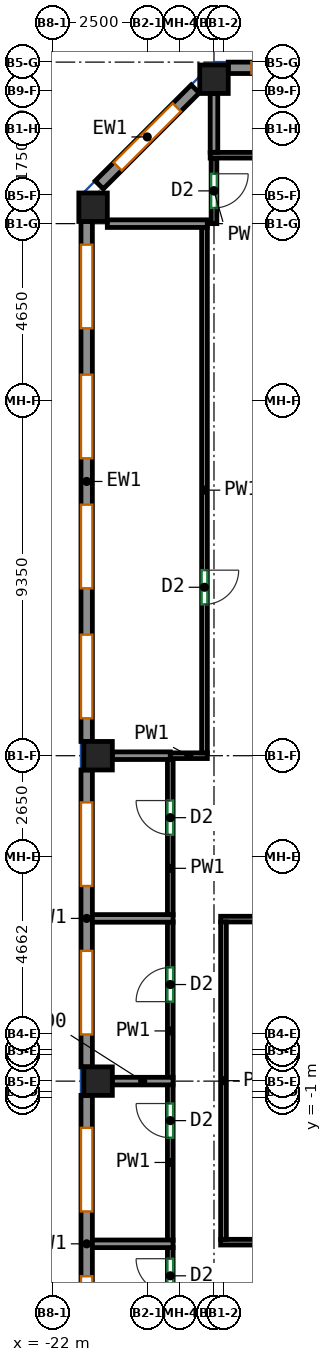
"""IFC4 building model, lengths in metres.
Left out: names, types, materials, properties, quantities, classifications, styles, units other than length and angle.
Written with IfcOpenShell. Run it as: python <this file> out.ifc"""

import sys

from ifc_helpers import new_model, si_unit, direction, frame, frame_2d, origin, origin_2d, place, context, subcontext, project, spatial, rectangle, extrude, source, transform, mapped, element, fill, save


model = new_model("IFC4")
c1 = context("Model", 3, precision=1e-05, world=origin(), true_north=direction((0.0, 1.0)))
c2 = subcontext(c1, "Body", "Model", "MODEL_VIEW")
j1 = project(units=[si_unit("LENGTHUNIT", "METRE"), si_unit("PLANEANGLEUNIT", "RADIAN")], contexts=[c1])
p1 = place(None, origin())
s1 = spatial("IfcSite", under=j1, at=p1, CompositionType="ELEMENT")
p2 = place(p1, origin())
s2 = spatial("IfcBuilding", under=s1, at=p2, CompositionType="ELEMENT")
p3 = place(p2, frame((0.0, 0.0, 220.3)))
s3 = spatial("IfcBuildingStorey", under=s2, at=p3, CompositionType="ELEMENT", Elevation=220.3)
m1 = source(origin(), c2, "Body", "SweptSolid", [
    extrude(rectangle(XDim=0.75, YDim=0.75, at=origin_2d()), origin(), (0.0, 0.0, 1.0), 3.0),
])
for number, where, z_axis, x_axis in (
    (1, (-20.932, 22.432, 0.0), (0.0, 0.0, 1.0), (1.0, 0.0, 0.0)),
    (2, (-20.8, -0.562, 0.0), (0.0, 0.0, 1.0), (1.0, 0.0, 0.0)),
    (3, (-20.8, 8.0, 0.0), (0.0, 0.0, 1.0), (1.0, 0.0, 0.0)),
    (4, (-17.75, 25.8, 0.0), (0.0, 0.0, 1.0), (1.0, 0.0, 0.0)),
):
    element("IfcColumn", number, at=place(p3, frame(where, z_axis=z_axis, x_axis=x_axis)), inside=s3, PredefinedType="COLUMN", context=c2, shape_type="MappedRepresentation", body=[
        mapped(m1, transform((0.0, 0.0, 0.0))),
    ])
m2 = source(origin(), c2, "Body", "SweptSolid", [
    extrude(rectangle(XDim=6.833, YDim=0.3, at=frame_2d((3.417, 0.0))), origin(), (0.0, 0.0, 1.0), 3.0),
])
p4 = place(p3, frame((-10.542, 26.1, 0.0), z_axis=(0.0, 0.0, 1.0), x_axis=(-1.0, 0.0, 0.0)))
e5 = element("IfcWall", 5, at=p4, inside=s3, PredefinedType="SOLIDWALL", context=c2, shape_type="MappedRepresentation", body=[
    mapped(m2, transform((0.0, 0.0, 0.0))),
])
p5 = place(p4, frame((0.608, 0.0, 0.85)))
e6 = element("IfcOpeningElement", 6, at=p5, cuts=e5, PredefinedType="OPENING", context=c2, shape_type="SweptSolid", body=[
    extrude(rectangle(XDim=2.2, YDim=1.95, at=frame_2d((1.1, 0.975))), frame((0.0, 0.16, 0.0), z_axis=(0.0, -1.0, 0.0), x_axis=(1.0, 0.0, 0.0)), (0.0, 0.0, 1.0), 0.32),
])
p6 = place(p4, frame((4.025, 0.0, 0.85)))
e7 = element("IfcOpeningElement", 7, at=p6, cuts=e5, PredefinedType="OPENING", context=c2, shape_type="SweptSolid", body=[
    extrude(rectangle(XDim=2.2, YDim=1.95, at=frame_2d((1.1, 0.975))), frame((0.0, 0.16, 0.0), z_axis=(0.0, -1.0, 0.0), x_axis=(1.0, 0.0, 0.0)), (0.0, 0.0, 1.0), 0.32),
])
m3 = source(origin(), c2, "Body", "SweptSolid", [
    extrude(rectangle(XDim=3.571, YDim=0.3, at=frame_2d((1.786, 0.0))), origin(), (0.0, 0.0, 1.0), 3.0),
])
p7 = place(p3, frame((-18.244, 25.544, 0.0), z_axis=(0.0, 0.0, 1.0), x_axis=(-0.707072595841, -0.707140964879, 0.0)))
e8 = element("IfcWall", 8, at=p7, inside=s3, PredefinedType="SOLIDWALL", context=c2, shape_type="MappedRepresentation", body=[
    mapped(m3, transform((0.0, 0.0, 0.0))),
])
p8 = place(p7, frame((0.686, 0.0, 0.85)))
e9 = element("IfcOpeningElement", 9, at=p8, cuts=e8, PredefinedType="OPENING", context=c2, shape_type="SweptSolid", body=[
    extrude(rectangle(XDim=2.2, YDim=1.95, at=frame_2d((1.1, 0.975))), frame((0.0, 0.16, 0.0), z_axis=(0.0, -1.0, 0.0), x_axis=(1.0, 0.0, 0.0)), (0.0, 0.0, 1.0), 0.32),
])
m4 = source(origin(), c2, "Body", "SweptSolid", [
    extrude(rectangle(XDim=13.682, YDim=0.3, at=frame_2d((6.841, 0.0))), origin(), (0.0, 0.0, 1.0), 3.0),
])
p9 = place(p3, frame((-21.1, 22.057, 0.0), z_axis=(0.0, 0.0, 1.0), x_axis=(0.0, -1.0, 0.0)))
e10 = element("IfcWall", 10, at=p9, inside=s3, PredefinedType="SOLIDWALL", context=c2, shape_type="MappedRepresentation", body=[
    mapped(m4, transform((0.0, 0.0, 0.0))),
])
p10 = place(p9, frame((0.61, 0.0, 0.85)))
e11 = element("IfcOpeningElement", 11, at=p10, cuts=e10, PredefinedType="OPENING", context=c2, shape_type="SweptSolid", body=[
    extrude(rectangle(XDim=2.2, YDim=1.95, at=frame_2d((1.1, 0.975))), frame((0.0, 0.16, 0.0), z_axis=(0.0, -1.0, 0.0), x_axis=(1.0, 0.0, 0.0)), (0.0, 0.0, 1.0), 0.32),
])
p11 = place(p9, frame((4.031, 0.0, 0.85)))
e12 = element("IfcOpeningElement", 12, at=p11, cuts=e10, PredefinedType="OPENING", context=c2, shape_type="SweptSolid", body=[
    extrude(rectangle(XDim=2.2, YDim=1.95, at=frame_2d((1.1, 0.975))), frame((0.0, 0.16, 0.0), z_axis=(0.0, -1.0, 0.0), x_axis=(1.0, 0.0, 0.0)), (0.0, 0.0, 1.0), 0.32),
])
p12 = place(p9, frame((7.451, 0.0, 0.85)))
e13 = element("IfcOpeningElement", 13, at=p12, cuts=e10, PredefinedType="OPENING", context=c2, shape_type="SweptSolid", body=[
    extrude(rectangle(XDim=2.2, YDim=1.95, at=frame_2d((1.1, 0.975))), frame((0.0, 0.16, 0.0), z_axis=(0.0, -1.0, 0.0), x_axis=(1.0, 0.0, 0.0)), (0.0, 0.0, 1.0), 0.32),
])
p13 = place(p9, frame((10.872, 0.0, 0.85)))
e14 = element("IfcOpeningElement", 14, at=p13, cuts=e10, PredefinedType="OPENING", context=c2, shape_type="SweptSolid", body=[
    extrude(rectangle(XDim=2.2, YDim=1.95, at=frame_2d((1.1, 0.975))), frame((0.0, 0.16, 0.0), z_axis=(0.0, -1.0, 0.0), x_axis=(1.0, 0.0, 0.0)), (0.0, 0.0, 1.0), 0.32),
])
m5 = source(origin(), c2, "Body", "SweptSolid", [
    extrude(rectangle(XDim=7.812, YDim=0.3, at=frame_2d((3.906, 0.0))), origin(), (0.0, 0.0, 1.0), 3.0),
])
p14 = place(p3, frame((-21.1, 7.625, 0.0), z_axis=(0.0, 0.0, 1.0), x_axis=(0.0, -1.0, 0.0)))
e15 = element("IfcWall", 15, at=p14, inside=s3, PredefinedType="SOLIDWALL", context=c2, shape_type="MappedRepresentation", body=[
    mapped(m5, transform((0.0, 0.0, 0.0))),
])
p15 = place(p14, frame((0.853, 0.0, 0.85)))
e16 = element("IfcOpeningElement", 16, at=p15, cuts=e15, PredefinedType="OPENING", context=c2, shape_type="SweptSolid", body=[
    extrude(rectangle(XDim=2.2, YDim=1.95, at=frame_2d((1.1, 0.975))), frame((0.0, 0.16, 0.0), z_axis=(0.0, -1.0, 0.0), x_axis=(1.0, 0.0, 0.0)), (0.0, 0.0, 1.0), 0.32),
])
p16 = place(p14, frame((4.759, 0.0, 0.85)))
e17 = element("IfcOpeningElement", 17, at=p16, cuts=e15, PredefinedType="OPENING", context=c2, shape_type="SweptSolid", body=[
    extrude(rectangle(XDim=2.2, YDim=1.95, at=frame_2d((1.1, 0.975))), frame((0.0, 0.16, 0.0), z_axis=(0.0, -1.0, 0.0), x_axis=(1.0, 0.0, 0.0)), (0.0, 0.0, 1.0), 0.32),
])
p17 = place(p3, frame((-21.1, -0.938, 0.0), z_axis=(0.0, 0.0, 1.0), x_axis=(0.0, -1.0, 0.0)))
e18 = element("IfcWall", 18, at=p17, inside=s3, PredefinedType="SOLIDWALL", context=c2, shape_type="MappedRepresentation", body=[
    mapped(m5, transform((0.0, 0.0, 0.0))),
])
p18 = place(p17, frame((0.853, 0.0, 0.85)))
e19 = element("IfcOpeningElement", 19, at=p18, cuts=e18, PredefinedType="OPENING", context=c2, shape_type="SweptSolid", body=[
    extrude(rectangle(XDim=2.2, YDim=1.95, at=frame_2d((1.1, 0.975))), frame((0.0, 0.16, 0.0), z_axis=(0.0, -1.0, 0.0), x_axis=(1.0, 0.0, 0.0)), (0.0, 0.0, 1.0), 0.32),
])
p19 = place(p17, frame((4.76, 0.0, 0.85)))
e20 = element("IfcOpeningElement", 20, at=p19, cuts=e18, PredefinedType="OPENING", context=c2, shape_type="SweptSolid", body=[
    extrude(rectangle(XDim=2.2, YDim=1.95, at=frame_2d((1.1, 0.975))), frame((0.0, 0.16, 0.0), z_axis=(0.0, -1.0, 0.0), x_axis=(1.0, 0.0, 0.0)), (0.0, 0.0, 1.0), 0.32),
])
p20 = place(p3, frame((-17.925, 8.0, 0.0), z_axis=(0.0, 0.0, 1.0), x_axis=(-1.0, 0.0, 0.0)))
e21 = element("IfcWall", 21, at=p20, inside=s3, PredefinedType="PARTITIONING", context=c2, shape_type="SweptSolid", body=[
    extrude(rectangle(XDim=0.976, YDim=0.15, at=frame_2d((0.488, 0.0))), origin(), (0.0, 0.0, 1.0), 3.0),
])
p21 = place(p3, frame((-18.0, 21.9, 0.0), z_axis=(0.0, 0.0, 1.0), x_axis=(0.0, -1.0, 0.0)))
e22 = element("IfcWall", 22, at=p21, inside=s3, PredefinedType="PARTITIONING", context=c2, shape_type="SweptSolid", body=[
    extrude(rectangle(XDim=13.825, YDim=0.15, at=frame_2d((6.913, 0.0))), origin(), (0.0, 0.0, 1.0), 3.0),
])
p22 = place(p21, frame((9.018, 0.0, 0.0)))
e23 = element("IfcOpeningElement", 23, at=p22, cuts=e22, PredefinedType="OPENING", context=c2, shape_type="SweptSolid", body=[
    extrude(rectangle(XDim=0.9, YDim=2.1, at=frame_2d((0.45, 1.05))), frame((0.0, 0.085, 0.0), z_axis=(0.0, -1.0, 0.0), x_axis=(1.0, 0.0, 0.0)), (0.0, 0.0, 1.0), 0.17),
])
p23 = place(p3, frame((-18.9, -7.757, 0.0), z_axis=(0.0, 0.0, 1.0), x_axis=(0.0, 1.0, 0.0)))
e24 = element("IfcWall", 24, at=p23, inside=s3, PredefinedType="PARTITIONING", context=c2, shape_type="SweptSolid", body=[
    extrude(rectangle(XDim=2.824, YDim=0.15, at=frame_2d((1.412, 0.0))), origin(), (0.0, 0.0, 1.0), 3.0),
])
p24 = place(p23, frame((1.622, 0.0, 0.0)))
e25 = element("IfcOpeningElement", 25, at=p24, cuts=e24, PredefinedType="OPENING", context=c2, shape_type="SweptSolid", body=[
    extrude(rectangle(XDim=0.9, YDim=2.1, at=frame_2d((0.45, 1.05))), frame((0.0, 0.085, 0.0), z_axis=(0.0, -1.0, 0.0), x_axis=(1.0, 0.0, 0.0)), (0.0, 0.0, 1.0), 0.17),
])
p25 = place(p3, frame((-18.9, -4.753, 0.0), z_axis=(0.0, 0.0, 1.0), x_axis=(0.0, 1.0, 0.0)))
e26 = element("IfcWall", 26, at=p25, inside=s3, PredefinedType="PARTITIONING", context=c2, shape_type="SweptSolid", body=[
    extrude(rectangle(XDim=4.101, YDim=0.15, at=frame_2d((2.05, 0.0))), origin(), (0.0, 0.0, 1.0), 3.0),
])
p26 = place(p25, frame((2.701, 0.0, 0.0)))
e27 = element("IfcOpeningElement", 27, at=p26, cuts=e26, PredefinedType="OPENING", context=c2, shape_type="SweptSolid", body=[
    extrude(rectangle(XDim=0.9, YDim=2.1, at=frame_2d((0.45, 1.05))), frame((0.0, 0.085, 0.0), z_axis=(0.0, -1.0, 0.0), x_axis=(1.0, 0.0, 0.0)), (0.0, 0.0, 1.0), 0.17),
])
p27 = place(p3, frame((-18.9, -0.472, 0.0), z_axis=(0.0, 0.0, 1.0), x_axis=(0.0, 1.0, 0.0)))
e28 = element("IfcWall", 28, at=p27, inside=s3, PredefinedType="PARTITIONING", context=c2, shape_type="SweptSolid", body=[
    extrude(rectangle(XDim=4.101, YDim=0.15, at=frame_2d((2.05, 0.0))), origin(), (0.0, 0.0, 1.0), 3.0),
])
p28 = place(p27, frame((2.001, 0.0, 0.0)))
e29 = element("IfcOpeningElement", 29, at=p28, cuts=e28, PredefinedType="OPENING", context=c2, shape_type="SweptSolid", body=[
    extrude(rectangle(XDim=0.9, YDim=2.1, at=frame_2d((0.45, 1.05))), frame((0.0, 0.085, 0.0), z_axis=(0.0, -1.0, 0.0), x_axis=(1.0, 0.0, 0.0)), (0.0, 0.0, 1.0), 0.17),
])
p29 = place(p3, frame((-18.9, 3.809, 0.0), z_axis=(0.0, 0.0, 1.0), x_axis=(0.0, 1.0, 0.0)))
e30 = element("IfcWall", 30, at=p29, inside=s3, PredefinedType="PARTITIONING", context=c2, shape_type="SweptSolid", body=[
    extrude(rectangle(XDim=4.092, YDim=0.15, at=frame_2d((2.046, 0.0))), origin(), (0.0, 0.0, 1.0), 3.0),
])
p30 = place(p29, frame((2.111, 0.0, 0.0)))
e31 = element("IfcOpeningElement", 31, at=p30, cuts=e30, PredefinedType="OPENING", context=c2, shape_type="SweptSolid", body=[
    extrude(rectangle(XDim=0.9, YDim=2.1, at=frame_2d((0.45, 1.05))), frame((0.0, 0.085, 0.0), z_axis=(0.0, -1.0, 0.0), x_axis=(1.0, 0.0, 0.0)), (0.0, 0.0, 1.0), 0.17),
])
p31 = place(p3, frame((-17.75, 23.725, 0.0), z_axis=(0.0, 0.0, 1.0), x_axis=(0.0, -1.0, 0.0)))
e32 = element("IfcWall", 32, at=p31, inside=s3, PredefinedType="PARTITIONING", context=c2, shape_type="SweptSolid", body=[
    extrude(rectangle(XDim=1.725, YDim=0.15, at=frame_2d((0.863, 0.0))), origin(), (0.0, 0.0, 1.0), 3.0),
])
p32 = place(p31, frame((0.413, 0.0, 0.0)))
e33 = element("IfcOpeningElement", 33, at=p32, cuts=e32, PredefinedType="OPENING", context=c2, shape_type="SweptSolid", body=[
    extrude(rectangle(XDim=0.9, YDim=2.1, at=frame_2d((0.45, 1.05))), frame((0.0, 0.085, 0.0), z_axis=(0.0, -1.0, 0.0), x_axis=(1.0, 0.0, 0.0)), (0.0, 0.0, 1.0), 0.17),
])
p33 = place(p3, frame((27.85, 23.8, 0.0), z_axis=(0.0, 0.0, 1.0), x_axis=(-1.0, 0.0, 0.0)))
e34 = element("IfcWall", 34, at=p33, inside=s3, PredefinedType="PARTITIONING", context=c2, shape_type="SweptSolid", body=[
    extrude(rectangle(XDim=45.7, YDim=0.15, at=frame_2d((22.85, 0.0))), origin(), (0.0, 0.0, 1.0), 3.0),
])
p34 = place(p33, frame((34.978, 0.0, 0.0)))
e35 = element("IfcOpeningElement", 35, at=p34, cuts=e34, PredefinedType="OPENING", context=c2, shape_type="SweptSolid", body=[
    extrude(rectangle(XDim=0.9, YDim=2.1, at=frame_2d((0.45, 1.05))), frame((0.0, 0.085, 0.0), z_axis=(0.0, -1.0, 0.0), x_axis=(1.0, 0.0, 0.0)), (0.0, 0.0, 1.0), 0.17),
])
p35 = place(p3, frame((-17.575, -4.8, 0.0), z_axis=(0.0, 0.0, 1.0), x_axis=(1.0, 0.0, 0.0)))
e36 = element("IfcWall", 36, at=p35, inside=s3, PredefinedType="PARTITIONING", context=c2, shape_type="SweptSolid", body=[
    extrude(rectangle(XDim=3.702, YDim=0.15, at=frame_2d((1.851, 0.0))), origin(), (0.0, 0.0, 1.0), 3.0),
])
p36 = place(p3, frame((-17.575, 3.7, 0.0), z_axis=(0.0, 0.0, 1.0), x_axis=(1.0, 0.0, 0.0)))
e37 = element("IfcWall", 37, at=p36, inside=s3, PredefinedType="PARTITIONING", context=c2, shape_type="SweptSolid", body=[
    extrude(rectangle(XDim=33.85, YDim=0.15, at=frame_2d((16.925, 0.0))), origin(), (0.0, 0.0, 1.0), 3.0),
])
p37 = place(p36, frame((4.301, 0.0, 0.0)))
e38 = element("IfcOpeningElement", 38, at=p37, cuts=e37, PredefinedType="OPENING", context=c2, shape_type="SweptSolid", body=[
    extrude(rectangle(XDim=0.9, YDim=2.1, at=frame_2d((0.45, 1.05))), frame((0.0, 0.085, 0.0), z_axis=(0.0, -1.0, 0.0), x_axis=(1.0, 0.0, 0.0)), (0.0, 0.0, 1.0), 0.17),
])
p38 = place(p36, frame((18.816, 0.0, 0.0)))
e39 = element("IfcOpeningElement", 39, at=p38, cuts=e37, PredefinedType="OPENING", context=c2, shape_type="SweptSolid", body=[
    extrude(rectangle(XDim=0.9, YDim=2.1, at=frame_2d((0.45, 1.05))), frame((0.0, 0.085, 0.0), z_axis=(0.0, -1.0, 0.0), x_axis=(1.0, 0.0, 0.0)), (0.0, 0.0, 1.0), 0.17),
])
p39 = place(p36, frame((26.656, 0.0, 0.0)))
e40 = element("IfcOpeningElement", 40, at=p39, cuts=e37, PredefinedType="OPENING", context=c2, shape_type="SweptSolid", body=[
    extrude(rectangle(XDim=0.9, YDim=2.1, at=frame_2d((0.45, 1.05))), frame((0.0, 0.085, 0.0), z_axis=(0.0, -1.0, 0.0), x_axis=(1.0, 0.0, 0.0)), (0.0, 0.0, 1.0), 0.17),
])
p40 = place(p3, frame((-17.5, -4.725, 0.0), z_axis=(0.0, 0.0, 1.0), x_axis=(0.0, 1.0, 0.0)))
e41 = element("IfcWall", 41, at=p40, inside=s3, PredefinedType="PARTITIONING", context=c2, shape_type="SweptSolid", body=[
    extrude(rectangle(XDim=8.35, YDim=0.15, at=frame_2d((4.175, 0.0))), origin(), (0.0, 0.0, 1.0), 3.0),
])
p41 = place(p3, frame((-20.425, 8.0, 0.0), z_axis=(0.0, 0.0, 1.0), x_axis=(0.999999794741, 0.000640717472, 0.0)))
e42 = element("IfcWall", 42, at=p41, inside=s3, PredefinedType="PARTITIONING", context=c2, shape_type="SweptSolid", body=[
    extrude(rectangle(XDim=1.524, YDim=0.2, at=frame_2d((0.762, 0.0))), origin(), (0.0, 0.0, 1.0), 3.0),
])
p42 = place(p3, frame((-20.557, 22.0, 0.0), z_axis=(0.0, 0.0, 1.0), x_axis=(1.0, 0.0, 0.0)))
e43 = element("IfcWall", 43, at=p42, inside=s3, PredefinedType="PARTITIONING", context=c2, shape_type="SweptSolid", body=[
    extrude(rectangle(XDim=2.63, YDim=0.2, at=frame_2d((1.315, 0.0))), origin(), (0.0, 0.0, 1.0), 3.0),
])
p43 = place(p3, frame((-21.0, -4.843, 0.0), z_axis=(0.0, 0.0, 1.0), x_axis=(1.0, 0.0, 0.0)))
e44 = element("IfcWall", 44, at=p43, inside=s3, PredefinedType="PARTITIONING", context=c2, shape_type="SweptSolid", body=[
    extrude(rectangle(XDim=2.173, YDim=0.2, at=frame_2d((1.086, 0.0))), origin(), (0.0, 0.0, 1.0), 3.0),
])
p44 = place(p3, frame((-18.827, -0.562, 0.0), z_axis=(0.0, 0.0, 1.0), x_axis=(-1.0, 0.0, 0.0)))
e45 = element("IfcWall", 45, at=p44, inside=s3, PredefinedType="PARTITIONING", context=c2, shape_type="SweptSolid", body=[
    extrude(rectangle(XDim=1.598, YDim=0.2, at=frame_2d((0.799, 0.0))), origin(), (0.0, 0.0, 1.0), 2.4),
])
p45 = place(p3, frame((-21.0, 3.719, 0.0), z_axis=(0.0, 0.0, 1.0), x_axis=(1.0, 0.0, 0.0)))
e46 = element("IfcWall", 46, at=p45, inside=s3, PredefinedType="PARTITIONING", context=c2, shape_type="SweptSolid", body=[
    extrude(rectangle(XDim=2.173, YDim=0.2, at=frame_2d((1.086, 0.0))), origin(), (0.0, 0.0, 1.0), 3.0),
])
p46 = place(p3, frame((-17.75, 23.877, 0.0), z_axis=(0.0, 0.0, 1.0), x_axis=(0.0, 1.0, 0.0)))
e47 = element("IfcWall", 47, at=p46, inside=s3, PredefinedType="PARTITIONING", context=c2, shape_type="SweptSolid", body=[
    extrude(rectangle(XDim=1.548, YDim=0.2, at=frame_2d((0.774, 0.0))), origin(), (0.0, 0.0, 1.0), 3.0),
])
p47 = place(p6, origin())
e48 = element("IfcWindow", 48, at=p47, inside=s3, PartitioningType="SINGLE_PANEL", PredefinedType="WINDOW", context=c2, shape_type="SweptSolid", body=[
    extrude(rectangle(XDim=2.2, YDim=1.95, at=frame_2d((1.1, 0.975))), frame((0.0, 0.03, 0.0), z_axis=(0.0, -1.0, 0.0), x_axis=(1.0, 0.0, 0.0)), (0.0, 0.0, 1.0), 0.06),
])
fill(e7, e48)
p48 = place(p8, origin())
e49 = element("IfcWindow", 49, at=p48, inside=s3, PartitioningType="SINGLE_PANEL", PredefinedType="WINDOW", context=c2, shape_type="SweptSolid", body=[
    extrude(rectangle(XDim=2.2, YDim=1.95, at=frame_2d((1.1, 0.975))), frame((0.0, 0.03, 0.0), z_axis=(0.0, -1.0, 0.0), x_axis=(1.0, 0.0, 0.0)), (0.0, 0.0, 1.0), 0.06),
])
fill(e9, e49)
p49 = place(p10, origin())
e50 = element("IfcWindow", 50, at=p49, inside=s3, PartitioningType="SINGLE_PANEL", PredefinedType="WINDOW", context=c2, shape_type="SweptSolid", body=[
    extrude(rectangle(XDim=2.2, YDim=1.95, at=frame_2d((1.1, 0.975))), frame((0.0, 0.03, 0.0), z_axis=(0.0, -1.0, 0.0), x_axis=(1.0, 0.0, 0.0)), (0.0, 0.0, 1.0), 0.06),
])
fill(e11, e50)
p50 = place(p11, origin())
e51 = element("IfcWindow", 51, at=p50, inside=s3, PartitioningType="SINGLE_PANEL", PredefinedType="WINDOW", context=c2, shape_type="SweptSolid", body=[
    extrude(rectangle(XDim=2.2, YDim=1.95, at=frame_2d((1.1, 0.975))), frame((0.0, 0.03, 0.0), z_axis=(0.0, -1.0, 0.0), x_axis=(1.0, 0.0, 0.0)), (0.0, 0.0, 1.0), 0.06),
])
fill(e12, e51)
p51 = place(p12, origin())
e52 = element("IfcWindow", 52, at=p51, inside=s3, PartitioningType="SINGLE_PANEL", PredefinedType="WINDOW", context=c2, shape_type="SweptSolid", body=[
    extrude(rectangle(XDim=2.2, YDim=1.95, at=frame_2d((1.1, 0.975))), frame((0.0, 0.03, 0.0), z_axis=(0.0, -1.0, 0.0), x_axis=(1.0, 0.0, 0.0)), (0.0, 0.0, 1.0), 0.06),
])
fill(e13, e52)
p52 = place(p13, origin())
e53 = element("IfcWindow", 53, at=p52, inside=s3, PartitioningType="SINGLE_PANEL", PredefinedType="WINDOW", context=c2, shape_type="SweptSolid", body=[
    extrude(rectangle(XDim=2.2, YDim=1.95, at=frame_2d((1.1, 0.975))), frame((0.0, 0.03, 0.0), z_axis=(0.0, -1.0, 0.0), x_axis=(1.0, 0.0, 0.0)), (0.0, 0.0, 1.0), 0.06),
])
fill(e14, e53)
p53 = place(p15, origin())
e54 = element("IfcWindow", 54, at=p53, inside=s3, PartitioningType="SINGLE_PANEL", PredefinedType="WINDOW", context=c2, shape_type="SweptSolid", body=[
    extrude(rectangle(XDim=2.2, YDim=1.95, at=frame_2d((1.1, 0.975))), frame((0.0, 0.03, 0.0), z_axis=(0.0, -1.0, 0.0), x_axis=(1.0, 0.0, 0.0)), (0.0, 0.0, 1.0), 0.06),
])
fill(e16, e54)
p54 = place(p16, origin())
e55 = element("IfcWindow", 55, at=p54, inside=s3, PartitioningType="SINGLE_PANEL", PredefinedType="WINDOW", context=c2, shape_type="SweptSolid", body=[
    extrude(rectangle(XDim=2.2, YDim=1.95, at=frame_2d((1.1, 0.975))), frame((0.0, 0.03, 0.0), z_axis=(0.0, -1.0, 0.0), x_axis=(1.0, 0.0, 0.0)), (0.0, 0.0, 1.0), 0.06),
])
fill(e17, e55)
p55 = place(p18, origin())
e56 = element("IfcWindow", 56, at=p55, inside=s3, PartitioningType="SINGLE_PANEL", PredefinedType="WINDOW", context=c2, shape_type="SweptSolid", body=[
    extrude(rectangle(XDim=2.2, YDim=1.95, at=frame_2d((1.1, 0.975))), frame((0.0, 0.03, 0.0), z_axis=(0.0, -1.0, 0.0), x_axis=(1.0, 0.0, 0.0)), (0.0, 0.0, 1.0), 0.06),
])
fill(e19, e56)
p56 = place(p19, origin())
e57 = element("IfcWindow", 57, at=p56, inside=s3, PartitioningType="SINGLE_PANEL", PredefinedType="WINDOW", context=c2, shape_type="SweptSolid", body=[
    extrude(rectangle(XDim=2.2, YDim=1.95, at=frame_2d((1.1, 0.975))), frame((0.0, 0.03, 0.0), z_axis=(0.0, -1.0, 0.0), x_axis=(1.0, 0.0, 0.0)), (0.0, 0.0, 1.0), 0.06),
])
fill(e20, e57)
p57 = place(p24, origin())
e58 = element("IfcDoor", 58, at=p57, inside=s3, OperationType="SINGLE_SWING_RIGHT", PredefinedType="DOOR", context=c2, shape_type="SweptSolid", body=[
    extrude(rectangle(XDim=0.9, YDim=2.1, at=frame_2d((0.45, 1.05))), frame((0.0, 0.025, 0.0), z_axis=(0.0, -1.0, 0.0), x_axis=(1.0, 0.0, 0.0)), (0.0, 0.0, 1.0), 0.05),
])
fill(e25, e58)
p58 = place(p26, origin())
e59 = element("IfcDoor", 59, at=p58, inside=s3, OperationType="SINGLE_SWING_RIGHT", PredefinedType="DOOR", context=c2, shape_type="SweptSolid", body=[
    extrude(rectangle(XDim=0.9, YDim=2.1, at=frame_2d((0.45, 1.05))), frame((0.0, 0.025, 0.0), z_axis=(0.0, -1.0, 0.0), x_axis=(1.0, 0.0, 0.0)), (0.0, 0.0, 1.0), 0.05),
])
fill(e27, e59)
p59 = place(p28, origin())
e60 = element("IfcDoor", 60, at=p59, inside=s3, OperationType="SINGLE_SWING_LEFT", PredefinedType="DOOR", context=c2, shape_type="SweptSolid", body=[
    extrude(rectangle(XDim=0.9, YDim=2.1, at=frame_2d((0.45, 1.05))), frame((0.0, 0.025, 0.0), z_axis=(0.0, -1.0, 0.0), x_axis=(1.0, 0.0, 0.0)), (0.0, 0.0, 1.0), 0.05),
])
fill(e29, e60)
p60 = place(p30, origin())
e61 = element("IfcDoor", 61, at=p60, inside=s3, OperationType="SINGLE_SWING_RIGHT", PredefinedType="DOOR", context=c2, shape_type="SweptSolid", body=[
    extrude(rectangle(XDim=0.9, YDim=2.1, at=frame_2d((0.45, 1.05))), frame((0.0, 0.025, 0.0), z_axis=(0.0, -1.0, 0.0), x_axis=(1.0, 0.0, 0.0)), (0.0, 0.0, 1.0), 0.05),
])
fill(e31, e61)
p61 = place(p22, origin())
e62 = element("IfcDoor", 62, at=p61, inside=s3, OperationType="SINGLE_SWING_LEFT", PredefinedType="DOOR", context=c2, shape_type="SweptSolid", body=[
    extrude(rectangle(XDim=0.9, YDim=2.1, at=frame_2d((0.45, 1.05))), frame((0.0, 0.025, 0.0), z_axis=(0.0, -1.0, 0.0), x_axis=(1.0, 0.0, 0.0)), (0.0, 0.0, 1.0), 0.05),
])
fill(e23, e62)
p62 = place(p32, origin())
e63 = element("IfcDoor", 63, at=p62, inside=s3, OperationType="SINGLE_SWING_LEFT", PredefinedType="DOOR", context=c2, shape_type="SweptSolid", body=[
    extrude(rectangle(XDim=0.9, YDim=2.1, at=frame_2d((0.45, 1.05))), frame((0.0, 0.025, 0.0), z_axis=(0.0, -1.0, 0.0), x_axis=(1.0, 0.0, 0.0)), (0.0, 0.0, 1.0), 0.05),
])
fill(e33, e63)
save(model, sys.argv[1])
